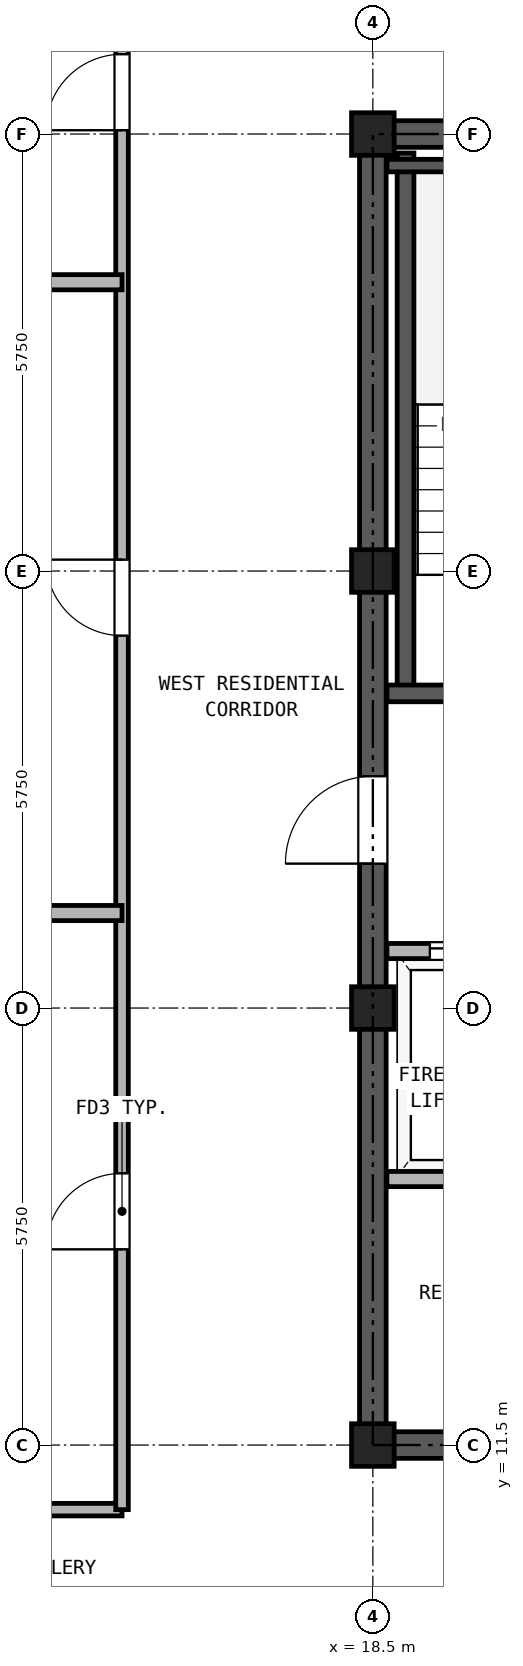
"""IFC4 building model, lengths in metres.
Left out: names, types, materials, properties, quantities, classifications, styles, units other than length and angle.
Written with IfcOpenShell. Run it as: python <this file> out.ifc"""

import sys

from ifc_helpers import new_model, si_unit, direction, frame, frame_2d, origin, origin_2d, place, context, subcontext, project, spatial, rectangle, hollow_rectangle, extrude, source, transform, mapped, element, fill, save


model = new_model("IFC4")
c1 = context("Model", 3, precision=1e-05, world=origin(), true_north=direction((0.0, 1.0)))
c2 = subcontext(c1, "Body", "Model", "MODEL_VIEW")
j1 = project(units=[si_unit("LENGTHUNIT", "METRE"), si_unit("PLANEANGLEUNIT", "RADIAN")], contexts=[c1])
p1 = place(None, origin())
s1 = spatial("IfcSite", under=j1, at=p1, CompositionType="ELEMENT")
p2 = place(p1, origin())
s2 = spatial("IfcBuilding", under=s1, at=p2, CompositionType="ELEMENT")
p3 = place(p2, frame((0.0, 0.0, 229.7)))
s3 = spatial("IfcBuildingStorey", under=s2, at=p3, CompositionType="ELEMENT", Elevation=229.7)
m1 = source(origin(), c2, "Body", "SweptSolid", [
    extrude(hollow_rectangle(XDim=0.56, YDim=0.56, WallThickness=0.03, at=origin_2d()), origin(), (0.0, 0.0, 1.0), 2.98),
])
for number, where, z_axis, x_axis in (
    (1, (18.5, 11.5, 0.0), (0.0, 0.0, 1.0), (1.0, 0.0, 0.0)),
    (2, (18.5, 17.25, 0.0), (0.0, 0.0, 1.0), (1.0, 0.0, 0.0)),
    (3, (18.5, 23.0, 0.0), (0.0, 0.0, 1.0), (1.0, 0.0, 0.0)),
    (4, (18.5, 28.75, 0.0), (0.0, 0.0, 1.0), (1.0, 0.0, 0.0)),
):
    element("IfcColumn", number, at=place(p3, frame(where, z_axis=z_axis, x_axis=x_axis)), inside=s3, PredefinedType="COLUMN", context=c2, shape_type="MappedRepresentation", body=[
        mapped(m1, transform((0.0, 0.0, 0.0), x_axis=(1.0, 0.0, 0.0), y_axis=(0.0, 1.0, 0.0), z_axis=(0.0, 0.0, 1.0), scale=1.0)),
    ])
p4 = place(p3, frame((18.325, 11.5, 0.0), z_axis=(0.0, 0.0, 1.0), x_axis=(1.0, 0.0, 0.0)))
e5 = element("IfcWall", 5, at=p4, inside=s3, PredefinedType="SHEAR", context=c2, shape_type="SweptSolid", body=[
    extrude(rectangle(XDim=10.35, YDim=0.35, at=frame_2d((5.175, 0.0))), origin(), (0.0, 0.0, 1.0), 2.98),
])
p5 = place(p4, frame((1.775, 0.0, 0.0)))
e6 = element("IfcOpeningElement", 6, at=p5, cuts=e5, PredefinedType="OPENING", context=c2, shape_type="SweptSolid", body=[
    extrude(rectangle(XDim=0.95, YDim=2.15, at=frame_2d((0.475, 1.075))), frame((0.0, 0.185, 0.0), z_axis=(0.0, -1.0, 0.0), x_axis=(1.0, 0.0, 0.0)), (0.0, 0.0, 1.0), 0.37),
])
p6 = place(p4, frame((5.275, 0.0, 0.0)))
e7 = element("IfcOpeningElement", 7, at=p6, cuts=e5, PredefinedType="OPENING", context=c2, shape_type="SweptSolid", body=[
    extrude(rectangle(XDim=0.95, YDim=2.15, at=frame_2d((0.475, 1.075))), frame((0.0, 0.185, 0.0), z_axis=(0.0, -1.0, 0.0), x_axis=(1.0, 0.0, 0.0)), (0.0, 0.0, 1.0), 0.37),
])
p7 = place(p4, frame((8.175, 0.0, 0.0)))
e8 = element("IfcOpeningElement", 8, at=p7, cuts=e5, PredefinedType="OPENING", context=c2, shape_type="SweptSolid", body=[
    extrude(rectangle(XDim=1.1, YDim=2.25, at=frame_2d((0.55, 1.125))), frame((0.0, 0.185, 0.0), z_axis=(0.0, -1.0, 0.0), x_axis=(1.0, 0.0, 0.0)), (0.0, 0.0, 1.0), 0.37),
])
p8 = place(p3, frame((18.325, 28.75, 0.0), z_axis=(0.0, 0.0, 1.0), x_axis=(1.0, 0.0, 0.0)))
e9 = element("IfcWall", 9, at=p8, inside=s3, PredefinedType="SHEAR", context=c2, shape_type="SweptSolid", body=[
    extrude(rectangle(XDim=10.35, YDim=0.35, at=frame_2d((5.175, 0.0))), origin(), (0.0, 0.0, 1.0), 2.98),
])
p9 = place(p8, frame((4.055, 0.0, 0.0)))
e10 = element("IfcOpeningElement", 10, at=p9, cuts=e9, PredefinedType="OPENING", context=c2, shape_type="SweptSolid", body=[
    extrude(rectangle(XDim=0.9, YDim=2.05, at=frame_2d((0.45, 1.025))), frame((0.0, 0.185, 0.0), z_axis=(0.0, -1.0, 0.0), x_axis=(1.0, 0.0, 0.0)), (0.0, 0.0, 1.0), 0.37),
])
p10 = place(p8, frame((5.595, 0.0, 0.0)))
e11 = element("IfcOpeningElement", 11, at=p10, cuts=e9, PredefinedType="OPENING", context=c2, shape_type="SweptSolid", body=[
    extrude(rectangle(XDim=0.9, YDim=2.05, at=frame_2d((0.45, 1.025))), frame((0.0, 0.185, 0.0), z_axis=(0.0, -1.0, 0.0), x_axis=(1.0, 0.0, 0.0)), (0.0, 0.0, 1.0), 0.37),
])
p11 = place(p3, frame((18.5, 11.675, 0.0), z_axis=(0.0, 0.0, 1.0), x_axis=(0.0, 1.0, 0.0)))
e12 = element("IfcWall", 12, at=p11, inside=s3, PredefinedType="SHEAR", context=c2, shape_type="SweptSolid", body=[
    extrude(rectangle(XDim=16.9, YDim=0.35, at=frame_2d((8.45, 0.0))), origin(), (0.0, 0.0, 1.0), 2.98),
])
p12 = place(p11, frame((7.475, 0.0, 0.0)))
e13 = element("IfcOpeningElement", 13, at=p12, cuts=e12, PredefinedType="OPENING", context=c2, shape_type="SweptSolid", body=[
    extrude(rectangle(XDim=1.15, YDim=2.2, at=frame_2d((0.575, 1.1))), frame((0.0, 0.185, 0.0), z_axis=(0.0, -1.0, 0.0), x_axis=(1.0, 0.0, 0.0)), (0.0, 0.0, 1.0), 0.37),
])
p13 = place(p3, frame((18.93, 21.39, 0.0), z_axis=(0.0, 0.0, 1.0), x_axis=(0.0, 1.0, 0.0)))
e14 = element("IfcWall", 14, at=p13, inside=s3, PredefinedType="SOLIDWALL", context=c2, shape_type="SweptSolid", body=[
    extrude(rectangle(XDim=7.11, YDim=0.22, at=frame_2d((3.555, 0.0))), origin(), (0.0, 0.0, 1.0), 2.98),
])
p14 = place(p3, frame((18.685, 28.335, 0.0), z_axis=(0.0, 0.0, 1.0), x_axis=(1.0, 0.0, 0.0)))
e15 = element("IfcWall", 15, at=p14, inside=s3, PredefinedType="PARTITIONING", context=c2, shape_type="SweptSolid", body=[
    extrude(rectangle(XDim=3.425, YDim=0.165, at=frame_2d((1.712, 0.0))), origin(), (0.0, 0.0, 1.0), 2.98),
])
p15 = place(p3, frame((18.685, 21.39, 0.0), z_axis=(0.0, 0.0, 1.0), x_axis=(1.0, 0.0, 0.0)))
e16 = element("IfcWall", 16, at=p15, inside=s3, PredefinedType="SOLIDWALL", context=c2, shape_type="SweptSolid", body=[
    extrude(rectangle(XDim=6.445, YDim=0.22, at=frame_2d((3.222, 0.0))), origin(), (0.0, 0.0, 1.0), 2.98),
])
p16 = place(p15, frame((1.165, 0.0, 0.0)))
e17 = element("IfcOpeningElement", 17, at=p16, cuts=e16, PredefinedType="OPENING", context=c2, shape_type="SweptSolid", body=[
    extrude(rectangle(XDim=1.15, YDim=2.2, at=frame_2d((0.575, 1.1))), frame((0.0, 0.12, 0.0), z_axis=(0.0, -1.0, 0.0), x_axis=(1.0, 0.0, 0.0)), (0.0, 0.0, 1.0), 0.24),
])
p17 = place(p15, frame((4.895, 0.0, 0.0)))
e18 = element("IfcOpeningElement", 18, at=p17, cuts=e16, PredefinedType="OPENING", context=c2, shape_type="SweptSolid", body=[
    extrude(rectangle(XDim=1.1, YDim=2.25, at=frame_2d((0.55, 1.125))), frame((0.0, 0.12, 0.0), z_axis=(0.0, -1.0, 0.0), x_axis=(1.0, 0.0, 0.0)), (0.0, 0.0, 1.0), 0.24),
])
p18 = place(p3, frame((18.685, 18.0, 0.0), z_axis=(0.0, 0.0, 1.0), x_axis=(1.0, 0.0, 0.0)))
e19 = element("IfcWall", 19, at=p18, inside=s3, PredefinedType="PARTITIONING", context=c2, shape_type="SweptSolid", body=[
    extrude(rectangle(XDim=9.63, YDim=0.2, at=frame_2d((4.815, 0.0))), origin(), (0.0, 0.0, 1.0), 2.98),
])
p19 = place(p18, frame((0.565, 0.0, 0.0)))
e20 = element("IfcOpeningElement", 20, at=p19, cuts=e19, PredefinedType="OPENING", context=c2, shape_type="SweptSolid", body=[
    extrude(rectangle(XDim=1.3, YDim=2.3, at=frame_2d((0.65, 1.15))), frame((0.0, 0.11, 0.0), z_axis=(0.0, -1.0, 0.0), x_axis=(1.0, 0.0, 0.0)), (0.0, 0.0, 1.0), 0.22),
])
p20 = place(p18, frame((2.665, 0.0, 0.0)))
e21 = element("IfcOpeningElement", 21, at=p20, cuts=e19, PredefinedType="OPENING", context=c2, shape_type="SweptSolid", body=[
    extrude(rectangle(XDim=1.3, YDim=2.3, at=frame_2d((0.65, 1.15))), frame((0.0, 0.11, 0.0), z_axis=(0.0, -1.0, 0.0), x_axis=(1.0, 0.0, 0.0)), (0.0, 0.0, 1.0), 0.22),
])
p21 = place(p18, frame((7.165, 0.0, 0.0)))
e22 = element("IfcOpeningElement", 22, at=p21, cuts=e19, PredefinedType="OPENING", context=c2, shape_type="SweptSolid", body=[
    extrude(rectangle(XDim=1.0, YDim=2.15, at=frame_2d((0.5, 1.075))), frame((0.0, 0.11, 0.0), z_axis=(0.0, -1.0, 0.0), x_axis=(1.0, 0.0, 0.0)), (0.0, 0.0, 1.0), 0.22),
])
p22 = place(p3, frame((18.685, 15.0, 0.0), z_axis=(0.0, 0.0, 1.0), x_axis=(1.0, 0.0, 0.0)))
e23 = element("IfcWall", 23, at=p22, inside=s3, PredefinedType="PARTITIONING", context=c2, shape_type="SweptSolid", body=[
    extrude(rectangle(XDim=9.63, YDim=0.2, at=frame_2d((4.815, 0.0))), origin(), (0.0, 0.0, 1.0), 2.98),
])
p23 = place(p3, frame((8.56, 10.65, 0.0), z_axis=(0.0, 0.0, 1.0), x_axis=(1.0, 0.0, 0.0)))
e24 = element("IfcWall", 24, at=p23, inside=s3, PredefinedType="PARTITIONING", context=c2, shape_type="SweptSolid", body=[
    extrude(rectangle(XDim=6.64, YDim=0.165, at=frame_2d((3.32, 0.0))), origin(), (0.0, 0.0, 1.0), 2.98),
])
p24 = place(p3, frame((15.2, 10.65, 0.0), z_axis=(0.0, 0.0, 1.0), x_axis=(0.0, 1.0, 0.0)))
e25 = element("IfcWall", 25, at=p24, inside=s3, PredefinedType="PARTITIONING", context=c2, shape_type="SweptSolid", body=[
    extrude(rectangle(XDim=24.49, YDim=0.165, at=frame_2d((12.245, 0.0))), origin(), (0.0, 0.0, 1.0), 2.98),
])
p25 = place(p24, frame((3.425, 0.0, 0.0)))
e26 = element("IfcOpeningElement", 26, at=p25, cuts=e25, PredefinedType="OPENING", context=c2, shape_type="SweptSolid", body=[
    extrude(rectangle(XDim=1.0, YDim=2.15, at=frame_2d((0.5, 1.075))), frame((0.0, 0.093, 0.0), z_axis=(0.0, -1.0, 0.0), x_axis=(1.0, 0.0, 0.0)), (0.0, 0.0, 1.0), 0.185),
])
p26 = place(p24, frame((11.5, 0.0, 0.0)))
e27 = element("IfcOpeningElement", 27, at=p26, cuts=e25, PredefinedType="OPENING", context=c2, shape_type="SweptSolid", body=[
    extrude(rectangle(XDim=1.0, YDim=2.15, at=frame_2d((0.5, 1.075))), frame((0.0, 0.093, 0.0), z_axis=(0.0, -1.0, 0.0), x_axis=(1.0, 0.0, 0.0)), (0.0, 0.0, 1.0), 0.185),
])
p27 = place(p24, frame((18.15, 0.0, 0.0)))
e28 = element("IfcOpeningElement", 28, at=p27, cuts=e25, PredefinedType="OPENING", context=c2, shape_type="SweptSolid", body=[
    extrude(rectangle(XDim=1.0, YDim=2.15, at=frame_2d((0.5, 1.075))), frame((0.0, 0.093, 0.0), z_axis=(0.0, -1.0, 0.0), x_axis=(1.0, 0.0, 0.0)), (0.0, 0.0, 1.0), 0.185),
])
for number, where, z_axis, x_axis in (
    (29, (5.36, 18.5, 0.0), (0.0, 0.0, 1.0), (1.0, 0.0, 0.0)),
    (30, (5.36, 26.8, 0.0), (0.0, 0.0, 1.0), (1.0, 0.0, 0.0)),
):
    element("IfcWall", number, at=place(p3, frame(where, z_axis=z_axis, x_axis=x_axis)), inside=s3, PredefinedType="PARTITIONING", context=c2, shape_type="SweptSolid", body=[
        extrude(rectangle(XDim=9.84, YDim=0.2, at=frame_2d((4.92, 0.0))), origin(), (0.0, 0.0, 1.0), 2.98),
    ])
p28 = place(p19, origin())
e31 = element("IfcDoor", 31, at=p28, inside=s3, OperationType="DOUBLE_DOOR_SLIDING", PredefinedType="DOOR", context=c2, shape_type="SweptSolid", body=[
    extrude(rectangle(XDim=1.3, YDim=2.3, at=frame_2d((0.65, 1.15))), frame((0.0, 0.025, 0.0), z_axis=(0.0, -1.0, 0.0), x_axis=(1.0, 0.0, 0.0)), (0.0, 0.0, 1.0), 0.05),
])
fill(e20, e31)
p29 = place(p12, frame((1.15, 0.0, 0.0), z_axis=(0.0, 0.0, 1.0), x_axis=(-1.0, 0.0, 0.0)))
e32 = element("IfcDoor", 32, at=p29, inside=s3, OperationType="SINGLE_SWING_LEFT", PredefinedType="DOOR", context=c2, shape_type="SweptSolid", body=[
    extrude(rectangle(XDim=1.15, YDim=2.2, at=frame_2d((0.575, 1.1))), frame((0.0, 0.025, 0.0), z_axis=(0.0, -1.0, 0.0), x_axis=(1.0, 0.0, 0.0)), (0.0, 0.0, 1.0), 0.05),
])
fill(e13, e32)
p30 = place(p25, origin())
e33 = element("IfcDoor", 33, at=p30, inside=s3, OperationType="SINGLE_SWING_LEFT", PredefinedType="DOOR", context=c2, shape_type="SweptSolid", body=[
    extrude(rectangle(XDim=1.0, YDim=2.15, at=frame_2d((0.5, 1.075))), frame((0.0, 0.025, 0.0), z_axis=(0.0, -1.0, 0.0), x_axis=(1.0, 0.0, 0.0)), (0.0, 0.0, 1.0), 0.05),
])
fill(e26, e33)
p31 = place(p26, origin())
e34 = element("IfcDoor", 34, at=p31, inside=s3, OperationType="SINGLE_SWING_RIGHT", PredefinedType="DOOR", context=c2, shape_type="SweptSolid", body=[
    extrude(rectangle(XDim=1.0, YDim=2.15, at=frame_2d((0.5, 1.075))), frame((0.0, 0.025, 0.0), z_axis=(0.0, -1.0, 0.0), x_axis=(1.0, 0.0, 0.0)), (0.0, 0.0, 1.0), 0.05),
])
fill(e27, e34)
p32 = place(p27, origin())
e35 = element("IfcDoor", 35, at=p32, inside=s3, OperationType="SINGLE_SWING_LEFT", PredefinedType="DOOR", context=c2, shape_type="SweptSolid", body=[
    extrude(rectangle(XDim=1.0, YDim=2.15, at=frame_2d((0.5, 1.075))), frame((0.0, 0.025, 0.0), z_axis=(0.0, -1.0, 0.0), x_axis=(1.0, 0.0, 0.0)), (0.0, 0.0, 1.0), 0.05),
])
fill(e28, e35)
save(model, sys.argv[1])
